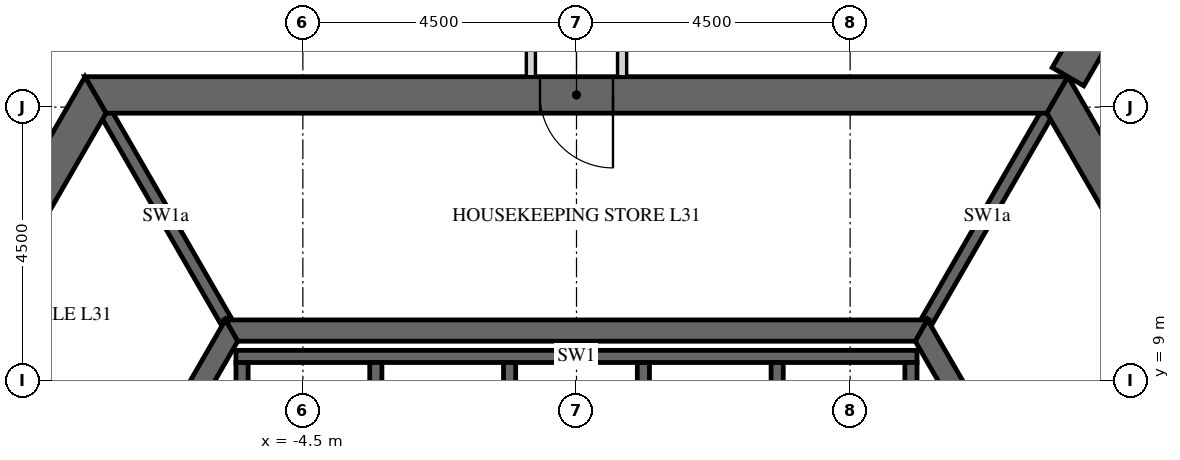
"""IFC4 building model, lengths in metres.
Left out: names, types, materials, properties, quantities, classifications, styles, units other than length and angle.
Written with IfcOpenShell. Run it as: python <this file> out.ifc"""

import sys

from ifc_helpers import new_model, si_unit, direction, frame, frame_2d, origin, place, context, subcontext, project, spatial, polyline, rectangle, outline, extrude, element, fill, save


model = new_model("IFC4")
c1 = context("Model", 3, precision=1e-05, world=origin(), true_north=direction((0.0, 1.0)))
c2 = subcontext(c1, "Body", "Model", "MODEL_VIEW")
j1 = project(units=[si_unit("LENGTHUNIT", "METRE"), si_unit("PLANEANGLEUNIT", "RADIAN")], contexts=[c1])
p1 = place(None, origin())
s1 = spatial("IfcSite", under=j1, at=p1, CompositionType="ELEMENT")
p2 = place(p1, origin())
s2 = spatial("IfcBuilding", under=s1, at=p2, CompositionType="ELEMENT")
p3 = place(p2, frame((0.0, 0.0, 135.0)))
s3 = spatial("IfcBuildingStorey", under=s2, at=p3, CompositionType="ELEMENT", Elevation=135.0)
p4 = place(p3, frame((-7.91, 13.7, -0.15), z_axis=(0.0, 0.0, 1.0), x_axis=(-0.499999880136, -0.866025472988, 0.0)))
e1 = element("IfcWall", 1, at=p4, inside=s3, PredefinedType="SHEAR", context=c2, shape_type="SweptSolid", body=[
    extrude(outline(polyline([(-0.173, -0.3), (15.993, -0.3), (15.646, 0.3), (0.173, 0.3), (-0.173, -0.3)])), origin(), (0.0, 0.0, 1.0), 3.9),
])
p5 = place(p4, frame((7.039, 0.0, 0.15)))
e2 = element("IfcOpeningElement", 2, at=p5, cuts=e1, PredefinedType="OPENING", context=c2, shape_type="SweptSolid", body=[
    extrude(rectangle(XDim=1.8, YDim=2.4, at=frame_2d((0.9, 1.2))), frame((0.0, 0.31, 0.0), z_axis=(0.0, -1.0, 0.0), x_axis=(1.0, 0.0, 0.0)), (0.0, 0.0, 1.0), 0.62),
])
p6 = place(p3, frame((15.819, 0.0, -0.15), z_axis=(0.0, 0.0, 1.0), x_axis=(-0.499999880136, 0.866025472988, 0.0)))
e3 = element("IfcWall", 3, at=p6, inside=s3, PredefinedType="SHEAR", context=c2, shape_type="SweptSolid", body=[
    extrude(outline(polyline([(-0.173, -0.3), (15.993, -0.3), (15.646, 0.3), (0.173, 0.3), (-0.173, -0.3)])), origin(), (0.0, 0.0, 1.0), 3.9),
])
p7 = place(p6, frame((6.981, 0.0, 0.15)))
e4 = element("IfcOpeningElement", 4, at=p7, cuts=e3, PredefinedType="OPENING", context=c2, shape_type="SweptSolid", body=[
    extrude(rectangle(XDim=1.8, YDim=2.4, at=frame_2d((0.9, 1.2))), frame((0.0, 0.31, 0.0), z_axis=(0.0, -1.0, 0.0), x_axis=(1.0, 0.0, 0.0)), (0.0, 0.0, 1.0), 0.62),
])
p8 = place(p3, frame((7.91, 13.7, -0.15), z_axis=(0.0, 0.0, 1.0), x_axis=(-1.0, 0.0, 0.0)))
e5 = element("IfcWall", 5, at=p8, inside=s3, PredefinedType="SHEAR", context=c2, shape_type="SweptSolid", body=[
    extrude(outline(polyline([(-0.173, -0.3), (15.993, -0.3), (15.646, 0.3), (0.173, 0.3), (-0.173, -0.3)])), origin(), (0.0, 0.0, 1.0), 3.9),
])
p9 = place(p8, frame((7.31, 0.0, 0.15)))
e6 = element("IfcOpeningElement", 6, at=p9, cuts=e5, PredefinedType="OPENING", context=c2, shape_type="SweptSolid", body=[
    extrude(rectangle(XDim=1.2, YDim=2.4, at=frame_2d((0.6, 1.2))), frame((0.0, 0.31, 0.0), z_axis=(0.0, -1.0, 0.0), x_axis=(1.0, 0.0, 0.0)), (0.0, 0.0, 1.0), 0.62),
])
p10 = place(p3, frame((8.083, 14.0, -0.15), z_axis=(0.0, 0.0, 1.0), x_axis=(0.499997680643, 0.866026742862, 0.0)))
e7 = element("IfcWall", 7, at=p10, inside=s3, PredefinedType="SHEAR", context=c2, shape_type="SweptSolid", body=[
    extrude(rectangle(XDim=16.509, YDim=0.6, at=frame_2d((8.254, 0.0))), origin(), (0.0, 0.0, 1.0), 3.9),
])
p11 = place(p10, frame((7.354, 0.0, 0.15)))
e8 = element("IfcOpeningElement", 8, at=p11, cuts=e7, PredefinedType="OPENING", context=c2, shape_type="SweptSolid", body=[
    extrude(rectangle(XDim=1.8, YDim=2.4, at=frame_2d((0.9, 1.2))), frame((0.0, 0.31, 0.0), z_axis=(0.0, -1.0, 0.0), x_axis=(1.0, 0.0, 0.0)), (0.0, 0.0, 1.0), 0.62),
])
p12 = place(p3, frame((-5.673, 9.825, -0.15), z_axis=(0.0, 0.0, 1.0), x_axis=(-0.499995046907, -0.866028263435, 0.0)))
e9 = element("IfcWall", 9, at=p12, inside=s3, PredefinedType="SHEAR", context=c2, shape_type="SweptSolid", body=[
    extrude(outline(polyline([(-0.101, -0.175), (11.446, -0.175), (11.244, 0.175), (0.101, 0.175), (-0.101, -0.175)])), origin(), (0.0, 0.0, 1.0), 3.9),
])
p13 = place(p12, frame((4.801, 0.0, 0.15)))
e10 = element("IfcOpeningElement", 10, at=p13, cuts=e9, PredefinedType="OPENING", context=c2, shape_type="SweptSolid", body=[
    extrude(rectangle(XDim=1.8, YDim=2.4, at=frame_2d((0.9, 1.2))), frame((0.0, 0.185, 0.0), z_axis=(0.0, -1.0, 0.0), x_axis=(1.0, 0.0, 0.0)), (0.0, 0.0, 1.0), 0.37),
])
p14 = place(p3, frame((11.345, 0.0, -0.15), z_axis=(0.0, 0.0, 1.0), x_axis=(-0.499995046907, 0.866028263435, 0.0)))
e11 = element("IfcWall", 11, at=p14, inside=s3, PredefinedType="SHEAR", context=c2, shape_type="SweptSolid", body=[
    extrude(outline(polyline([(-0.101, -0.175), (11.446, -0.175), (11.244, 0.175), (0.101, 0.175), (-0.101, -0.175)])), origin(), (0.0, 0.0, 1.0), 3.9),
])
p15 = place(p14, frame((4.744, 0.0, 0.15)))
e12 = element("IfcOpeningElement", 12, at=p15, cuts=e11, PredefinedType="OPENING", context=c2, shape_type="SweptSolid", body=[
    extrude(rectangle(XDim=1.8, YDim=2.4, at=frame_2d((0.9, 1.2))), frame((0.0, 0.185, 0.0), z_axis=(0.0, -1.0, 0.0), x_axis=(1.0, 0.0, 0.0)), (0.0, 0.0, 1.0), 0.37),
])
p16 = place(p3, frame((5.673, 9.825, -0.15), z_axis=(0.0, 0.0, 1.0), x_axis=(-1.0, 0.0, 0.0)))
e13 = element("IfcWall", 13, at=p16, inside=s3, PredefinedType="SHEAR", context=c2, shape_type="SweptSolid", body=[
    extrude(outline(polyline([(-0.101, -0.175), (11.446, -0.175), (11.244, 0.175), (0.101, 0.175), (-0.101, -0.175)])), origin(), (0.0, 0.0, 1.0), 3.9),
])
p17 = place(p3, frame((-5.6, 9.4, -0.25), z_axis=(0.0, 0.0, 1.0), x_axis=(1.0, 0.0, 0.0)))
e14 = element("IfcWall", 14, at=p17, inside=s3, PredefinedType="SHEAR", context=c2, shape_type="SweptSolid", body=[
    extrude(rectangle(XDim=11.2, YDim=0.2, at=frame_2d((5.6, 0.0))), origin(), (0.0, 0.0, 1.0), 3.9),
])
for number, where, z_axis, x_axis in (
    (15, (-5.5, 6.4, -0.25), (0.0, 0.0, 1.0), (0.0, 1.0, 0.0)),
    (16, (-3.3, 6.4, -0.25), (0.0, 0.0, 1.0), (0.0, 1.0, 0.0)),
    (17, (-1.1, 6.4, -0.25), (0.0, 0.0, 1.0), (0.0, 1.0, 0.0)),
    (18, (1.1, 6.4, -0.25), (0.0, 0.0, 1.0), (0.0, 1.0, 0.0)),
    (19, (3.3, 6.4, -0.25), (0.0, 0.0, 1.0), (0.0, 1.0, 0.0)),
    (20, (5.5, 6.4, -0.25), (0.0, 0.0, 1.0), (0.0, 1.0, 0.0)),
):
    element("IfcWall", number, at=place(p3, frame(where, z_axis=z_axis, x_axis=x_axis)), inside=s3, PredefinedType="SHEAR", context=c2, shape_type="SweptSolid", body=[
        extrude(rectangle(XDim=2.9, YDim=0.2, at=frame_2d((1.45, 0.0))), origin(), (0.0, 0.0, 1.0), 3.9),
    ])
for number, where, z_axis, x_axis in (
    (21, (5.773, 10.0, -0.15), (0.0, 0.0, 1.0), (0.5, 0.866, 0.0)),
    (22, (-5.773, 10.0, -0.15), (0.0, 0.0, 1.0), (-0.5, 0.866, 0.0)),
):
    element("IfcWall", number, at=place(p3, frame(where, z_axis=z_axis, x_axis=x_axis)), inside=s3, PredefinedType="SHEAR", context=c2, shape_type="SweptSolid", body=[
        extrude(rectangle(XDim=3.926, YDim=0.2, at=frame_2d((1.963, 0.0))), origin(), (0.0, 0.0, 1.0), 3.9),
    ])
p18 = place(p3, frame((-0.75, 19.775, 0.0), z_axis=(0.0, 0.0, 1.0), x_axis=(0.0, -1.0, 0.0)))
e23 = element("IfcWall", 23, at=p18, inside=s3, PredefinedType="PARTITIONING", context=c2, shape_type="SweptSolid", body=[
    extrude(rectangle(XDim=5.775, YDim=0.15, at=frame_2d((2.887, 0.0))), origin(), (0.0, 0.0, 1.0), 2.838),
])
p19 = place(p3, frame((0.75, 14.0, 0.0), z_axis=(0.0, 0.0, 1.0), x_axis=(0.0, 1.0, 0.0)))
e24 = element("IfcWall", 24, at=p19, inside=s3, PredefinedType="PARTITIONING", context=c2, shape_type="SweptSolid", body=[
    extrude(rectangle(XDim=5.85, YDim=0.15, at=frame_2d((2.925, 0.0))), origin(), (0.0, 0.0, 1.0), 2.838),
])
p20 = place(p9, origin())
e25 = element("IfcDoor", 25, at=p20, inside=s3, OperationType="SINGLE_SWING_LEFT", PredefinedType="DOOR", context=c2, shape_type="SweptSolid", body=[
    extrude(rectangle(XDim=1.2, YDim=2.4, at=frame_2d((0.6, 1.2))), frame((0.0, 0.025, 0.0), z_axis=(0.0, -1.0, 0.0), x_axis=(1.0, 0.0, 0.0)), (0.0, 0.0, 1.0), 0.05),
])
fill(e6, e25)
save(model, sys.argv[1])
